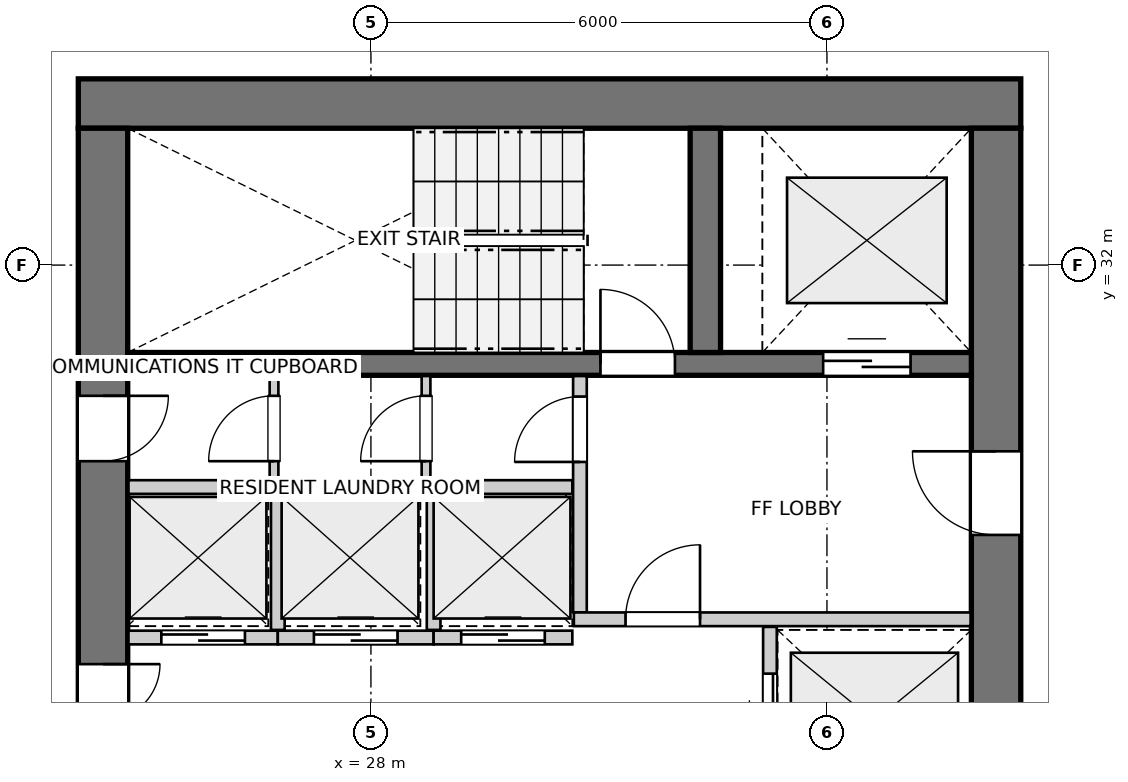
"""IFC4 building model, lengths in metres.
Left out: names, types, materials, properties, quantities, classifications, styles, units other than length and angle.
Written with IfcOpenShell. Run it as: python <this file> out.ifc"""

import sys

from ifc_helpers import new_model, si_unit, direction, frame, frame_2d, origin, place, context, subcontext, project, spatial, rectangle, extrude, source, transform, mapped, element, fill, save


model = new_model("IFC4")
c1 = context("Model", 3, precision=1e-05, world=origin(), true_north=direction((0.0, 1.0)))
c2 = subcontext(c1, "Body", "Model", "MODEL_VIEW")
j1 = project(units=[si_unit("LENGTHUNIT", "METRE"), si_unit("PLANEANGLEUNIT", "RADIAN")], contexts=[c1])
p1 = place(None, origin())
s1 = spatial("IfcSite", under=j1, at=p1, CompositionType="ELEMENT")
p2 = place(p1, origin())
s2 = spatial("IfcBuilding", under=s1, at=p2, CompositionType="ELEMENT")
p3 = place(p2, frame((0.0, 0.0, 155.4)))
s3 = spatial("IfcBuildingStorey", under=s2, at=p3, CompositionType="ELEMENT", Elevation=155.4)
p4 = place(p3, frame((36.55, 34.125, 0.0), z_axis=(0.0, 0.0, 1.0), x_axis=(-1.0, 0.0, 0.0)))
e1 = element("IfcWall", 1, at=p4, inside=s3, PredefinedType="SHEAR", context=c2, shape_type="SweptSolid", body=[
    extrude(rectangle(XDim=12.4, YDim=0.65, at=frame_2d((6.2, 0.0))), origin(), (0.0, 0.0, 1.0), 2.935),
])
p5 = place(p3, frame((24.475, 33.8, 0.0), z_axis=(0.0, 0.0, 1.0), x_axis=(0.0, -1.0, 0.0)))
e2 = element("IfcWall", 2, at=p5, inside=s3, PredefinedType="SHEAR", context=c2, shape_type="SweptSolid", body=[
    extrude(rectangle(XDim=15.6, YDim=0.65, at=frame_2d((7.8, 0.0))), origin(), (0.0, 0.0, 1.0), 2.935),
])
p6 = place(p5, frame((7.05, 0.0, 0.0)))
e3 = element("IfcOpeningElement", 3, at=p6, cuts=e2, PredefinedType="OPENING", context=c2, shape_type="SweptSolid", body=[
    extrude(rectangle(XDim=1.5, YDim=2.15, at=frame_2d((0.75, 1.075))), frame((0.0, 0.335, 0.0), z_axis=(0.0, -1.0, 0.0), x_axis=(1.0, 0.0, 0.0)), (0.0, 0.0, 1.0), 0.67),
])
p7 = place(p5, frame((3.52, 0.0, 0.0)))
e4 = element("IfcOpeningElement", 4, at=p7, cuts=e2, PredefinedType="OPENING", context=c2, shape_type="SweptSolid", body=[
    extrude(rectangle(XDim=0.86, YDim=2.05, at=frame_2d((0.43, 1.025))), frame((0.0, 0.335, 0.0), z_axis=(0.0, -1.0, 0.0), x_axis=(1.0, 0.0, 0.0)), (0.0, 0.0, 1.0), 0.67),
])
p8 = place(p5, frame((11.22, 0.0, 0.0)))
e5 = element("IfcOpeningElement", 5, at=p8, cuts=e2, PredefinedType="OPENING", context=c2, shape_type="SweptSolid", body=[
    extrude(rectangle(XDim=0.86, YDim=2.05, at=frame_2d((0.43, 1.025))), frame((0.0, 0.335, 0.0), z_axis=(0.0, -1.0, 0.0), x_axis=(1.0, 0.0, 0.0)), (0.0, 0.0, 1.0), 0.67),
])
p9 = place(p3, frame((36.225, 18.2, 0.0), z_axis=(0.0, 0.0, 1.0), x_axis=(0.0, 1.0, 0.0)))
e6 = element("IfcWall", 6, at=p9, inside=s3, PredefinedType="SHEAR", context=c2, shape_type="SweptSolid", body=[
    extrude(rectangle(XDim=15.6, YDim=0.65, at=frame_2d((7.8, 0.0))), origin(), (0.0, 0.0, 1.0), 2.935),
])
p10 = place(p9, frame((4.25, 0.0, 0.0)))
e7 = element("IfcOpeningElement", 7, at=p10, cuts=e6, PredefinedType="OPENING", context=c2, shape_type="SweptSolid", body=[
    extrude(rectangle(XDim=1.1, YDim=2.15, at=frame_2d((0.55, 1.075))), frame((0.0, 0.335, 0.0), z_axis=(0.0, -1.0, 0.0), x_axis=(1.0, 0.0, 0.0)), (0.0, 0.0, 1.0), 0.67),
])
p11 = place(p9, frame((10.25, 0.0, 0.0)))
e8 = element("IfcOpeningElement", 8, at=p11, cuts=e6, PredefinedType="OPENING", context=c2, shape_type="SweptSolid", body=[
    extrude(rectangle(XDim=1.1, YDim=2.15, at=frame_2d((0.55, 1.075))), frame((0.0, 0.335, 0.0), z_axis=(0.0, -1.0, 0.0), x_axis=(1.0, 0.0, 0.0)), (0.0, 0.0, 1.0), 0.67),
])
p12 = place(p3, frame((24.8, 30.7, 0.0), z_axis=(0.0, 0.0, 1.0), x_axis=(1.0, 0.0, 0.0)))
e9 = element("IfcWall", 9, at=p12, inside=s3, PredefinedType="SHEAR", context=c2, shape_type="SweptSolid", body=[
    extrude(rectangle(XDim=11.1, YDim=0.3, at=frame_2d((5.55, 0.0))), origin(), (0.0, 0.0, 1.0), 2.935),
])
p13 = place(p12, frame((6.22, 0.0, 0.0)))
e10 = element("IfcOpeningElement", 10, at=p13, cuts=e9, PredefinedType="OPENING", context=c2, shape_type="SweptSolid", body=[
    extrude(rectangle(XDim=0.98, YDim=2.15, at=frame_2d((0.49, 1.075))), frame((0.0, 0.16, 0.0), z_axis=(0.0, -1.0, 0.0), x_axis=(1.0, 0.0, 0.0)), (0.0, 0.0, 1.0), 0.32),
])
p14 = place(p12, frame((9.15, 0.0, 0.0)))
e11 = element("IfcOpeningElement", 11, at=p14, cuts=e9, PredefinedType="OPENING", context=c2, shape_type="SweptSolid", body=[
    extrude(rectangle(XDim=1.15, YDim=2.15, at=frame_2d((0.575, 1.075))), frame((0.0, 0.16, 0.0), z_axis=(0.0, -1.0, 0.0), x_axis=(1.0, 0.0, 0.0)), (0.0, 0.0, 1.0), 0.32),
])
p15 = place(p3, frame((32.4, 30.85, 0.0), z_axis=(0.0, 0.0, 1.0), x_axis=(0.0, 1.0, 0.0)))
e12 = element("IfcWall", 12, at=p15, inside=s3, PredefinedType="SHEAR", context=c2, shape_type="SweptSolid", body=[
    extrude(rectangle(XDim=2.95, YDim=0.4, at=frame_2d((1.475, 0.0))), origin(), (0.0, 0.0, 1.0), 2.935),
])
p16 = place(p3, frame((30.75, 27.43, 0.0), z_axis=(0.0, 0.0, 1.0), x_axis=(0.0, 1.0, 0.0)))
e13 = element("IfcWall", 13, at=p16, inside=s3, PredefinedType="PARTITIONING", context=c2, shape_type="SweptSolid", body=[
    extrude(rectangle(XDim=3.11, YDim=0.18, at=frame_2d((1.555, 0.0))), origin(), (0.0, 0.0, 1.0), 2.935),
])
p17 = place(p16, frame((1.98, 0.0, 0.0)))
e14 = element("IfcOpeningElement", 14, at=p17, cuts=e13, PredefinedType="OPENING", context=c2, shape_type="SweptSolid", body=[
    extrude(rectangle(XDim=0.86, YDim=2.05, at=frame_2d((0.43, 1.025))), frame((0.0, 0.1, 0.0), z_axis=(0.0, -1.0, 0.0), x_axis=(1.0, 0.0, 0.0)), (0.0, 0.0, 1.0), 0.2),
])
p18 = place(p3, frame((30.67, 27.34, 0.0), z_axis=(0.0, 0.0, 1.0), x_axis=(1.0, 0.0, 0.0)))
e15 = element("IfcWall", 15, at=p18, inside=s3, PredefinedType="PARTITIONING", context=c2, shape_type="SweptSolid", body=[
    extrude(rectangle(XDim=5.22, YDim=0.18, at=frame_2d((2.61, 0.0))), origin(), (0.0, 0.0, 1.0), 2.935),
])
p19 = place(p18, frame((0.68, 0.0, 0.0)))
e16 = element("IfcOpeningElement", 16, at=p19, cuts=e15, PredefinedType="OPENING", context=c2, shape_type="SweptSolid", body=[
    extrude(rectangle(XDim=0.98, YDim=2.15, at=frame_2d((0.49, 1.075))), frame((0.0, 0.1, 0.0), z_axis=(0.0, -1.0, 0.0), x_axis=(1.0, 0.0, 0.0)), (0.0, 0.0, 1.0), 0.2),
])
p20 = place(p3, frame((33.25, 24.76, 0.0), z_axis=(0.0, 0.0, 1.0), x_axis=(0.0, 1.0, 0.0)))
e17 = element("IfcWall", 17, at=p20, inside=s3, PredefinedType="PARTITIONING", context=c2, shape_type="SweptSolid", body=[
    extrude(rectangle(XDim=2.48, YDim=0.18, at=frame_2d((1.24, 0.0))), origin(), (0.0, 0.0, 1.0), 2.935),
])
p21 = place(p20, frame((0.615, 0.0, 0.0)))
e18 = element("IfcOpeningElement", 18, at=p21, cuts=e17, PredefinedType="OPENING", context=c2, shape_type="SweptSolid", body=[
    extrude(rectangle(XDim=1.25, YDim=2.15, at=frame_2d((0.625, 1.075))), frame((0.0, 0.1, 0.0), z_axis=(0.0, -1.0, 0.0), x_axis=(1.0, 0.0, 0.0)), (0.0, 0.0, 1.0), 0.2),
])
p22 = place(p3, frame((24.81, 29.08, 0.0), z_axis=(0.0, 0.0, 1.0), x_axis=(1.0, 0.0, 0.0)))
e19 = element("IfcWall", 19, at=p22, inside=s3, PredefinedType="PARTITIONING", context=c2, shape_type="SweptSolid", body=[
    extrude(rectangle(XDim=5.84, YDim=0.18, at=frame_2d((2.92, 0.0))), origin(), (0.0, 0.0, 1.0), 2.935),
])
p23 = place(p3, frame((24.81, 27.1, 0.0), z_axis=(0.0, 0.0, 1.0), x_axis=(1.0, 0.0, 0.0)))
e20 = element("IfcWall", 20, at=p23, inside=s3, PredefinedType="PARTITIONING", context=c2, shape_type="SweptSolid", body=[
    extrude(rectangle(XDim=1.965, YDim=0.18, at=frame_2d((0.982, 0.0))), origin(), (0.0, 0.0, 1.0), 2.935),
])
p24 = place(p23, frame((0.433, 0.0, 0.0)))
e21 = element("IfcOpeningElement", 21, at=p24, cuts=e20, PredefinedType="OPENING", context=c2, shape_type="SweptSolid", body=[
    extrude(rectangle(XDim=1.1, YDim=2.15, at=frame_2d((0.55, 1.075))), frame((0.0, 0.1, 0.0), z_axis=(0.0, -1.0, 0.0), x_axis=(1.0, 0.0, 0.0)), (0.0, 0.0, 1.0), 0.2),
])
p25 = place(p3, frame((26.775, 27.1, 0.0), z_axis=(0.0, 0.0, 1.0), x_axis=(1.0, 0.0, 0.0)))
e22 = element("IfcWall", 22, at=p25, inside=s3, PredefinedType="PARTITIONING", context=c2, shape_type="SweptSolid", body=[
    extrude(rectangle(XDim=2.05, YDim=0.18, at=frame_2d((1.025, 0.0))), origin(), (0.0, 0.0, 1.0), 2.935),
])
p26 = place(p25, frame((0.475, 0.0, 0.0)))
e23 = element("IfcOpeningElement", 23, at=p26, cuts=e22, PredefinedType="OPENING", context=c2, shape_type="SweptSolid", body=[
    extrude(rectangle(XDim=1.1, YDim=2.15, at=frame_2d((0.55, 1.075))), frame((0.0, 0.1, 0.0), z_axis=(0.0, -1.0, 0.0), x_axis=(1.0, 0.0, 0.0)), (0.0, 0.0, 1.0), 0.2),
])
p27 = place(p3, frame((26.775, 27.2, 0.0), z_axis=(0.0, 0.0, 1.0), x_axis=(0.0, 1.0, 0.0)))
e24 = element("IfcWall", 24, at=p27, inside=s3, PredefinedType="PARTITIONING", context=c2, shape_type="SweptSolid", body=[
    extrude(rectangle(XDim=1.78, YDim=0.18, at=frame_2d((0.89, 0.0))), origin(), (0.0, 0.0, 1.0), 2.935),
])
p28 = place(p3, frame((28.825, 27.1, 0.0), z_axis=(0.0, 0.0, 1.0), x_axis=(1.0, 0.0, 0.0)))
e25 = element("IfcWall", 25, at=p28, inside=s3, PredefinedType="PARTITIONING", context=c2, shape_type="SweptSolid", body=[
    extrude(rectangle(XDim=1.825, YDim=0.18, at=frame_2d((0.913, 0.0))), origin(), (0.0, 0.0, 1.0), 2.935),
])
p29 = place(p28, frame((0.363, 0.0, 0.0)))
e26 = element("IfcOpeningElement", 26, at=p29, cuts=e25, PredefinedType="OPENING", context=c2, shape_type="SweptSolid", body=[
    extrude(rectangle(XDim=1.1, YDim=2.15, at=frame_2d((0.55, 1.075))), frame((0.0, 0.1, 0.0), z_axis=(0.0, -1.0, 0.0), x_axis=(1.0, 0.0, 0.0)), (0.0, 0.0, 1.0), 0.2),
])
p30 = place(p3, frame((28.825, 27.2, 0.0), z_axis=(0.0, 0.0, 1.0), x_axis=(0.0, 1.0, 0.0)))
e27 = element("IfcWall", 27, at=p30, inside=s3, PredefinedType="PARTITIONING", context=c2, shape_type="SweptSolid", body=[
    extrude(rectangle(XDim=1.78, YDim=0.18, at=frame_2d((0.89, 0.0))), origin(), (0.0, 0.0, 1.0), 2.935),
])
p31 = place(p3, frame((26.725, 29.16, 0.0), z_axis=(0.0, 0.0, 1.0), x_axis=(0.0, 1.0, 0.0)))
e28 = element("IfcWall", 28, at=p31, inside=s3, PredefinedType="PARTITIONING", context=c2, shape_type="SweptSolid", body=[
    extrude(rectangle(XDim=1.38, YDim=0.115, at=frame_2d((0.69, 0.0))), origin(), (0.0, 0.0, 1.0), 2.935),
])
p32 = place(p31, frame((0.26, 0.0, 0.0)))
e29 = element("IfcOpeningElement", 29, at=p32, cuts=e28, PredefinedType="OPENING", context=c2, shape_type="SweptSolid", body=[
    extrude(rectangle(XDim=0.86, YDim=2.05, at=frame_2d((0.43, 1.025))), frame((0.0, 0.067, 0.0), z_axis=(0.0, -1.0, 0.0), x_axis=(1.0, 0.0, 0.0)), (0.0, 0.0, 1.0), 0.135),
])
p33 = place(p3, frame((28.725, 29.16, 0.0), z_axis=(0.0, 0.0, 1.0), x_axis=(0.0, 1.0, 0.0)))
e30 = element("IfcWall", 30, at=p33, inside=s3, PredefinedType="PARTITIONING", context=c2, shape_type="SweptSolid", body=[
    extrude(rectangle(XDim=1.38, YDim=0.115, at=frame_2d((0.69, 0.0))), origin(), (0.0, 0.0, 1.0), 2.935),
])
p34 = place(p33, frame((0.26, 0.0, 0.0)))
e31 = element("IfcOpeningElement", 31, at=p34, cuts=e30, PredefinedType="OPENING", context=c2, shape_type="SweptSolid", body=[
    extrude(rectangle(XDim=0.86, YDim=2.05, at=frame_2d((0.43, 1.025))), frame((0.0, 0.067, 0.0), z_axis=(0.0, -1.0, 0.0), x_axis=(1.0, 0.0, 0.0)), (0.0, 0.0, 1.0), 0.135),
])
m1 = source(origin(), c2, "Body", "SweptSolid", [
    extrude(rectangle(XDim=0.98, YDim=2.15, at=frame_2d((0.49, 1.075))), frame((0.0, 0.025, 0.0), z_axis=(0.0, -1.0, 0.0), x_axis=(1.0, 0.0, 0.0)), (0.0, 0.0, 1.0), 0.05),
])
p35 = place(p13, origin())
e32 = element("IfcDoor", 32, at=p35, inside=s3, OperationType="SINGLE_SWING_LEFT", PredefinedType="DOOR", context=c2, shape_type="MappedRepresentation", body=[
    mapped(m1, transform((0.0, 0.0, 0.0), x_axis=(1.0, 0.0, 0.0), y_axis=(0.0, 1.0, 0.0), z_axis=(0.0, 0.0, 1.0), scale=1.0)),
])
fill(e10, e32)
m2 = source(origin(), c2, "Body", "SweptSolid", [
    extrude(rectangle(XDim=1.15, YDim=2.15, at=frame_2d((0.575, 1.075))), frame((0.0, 0.025, 0.0), z_axis=(0.0, -1.0, 0.0), x_axis=(1.0, 0.0, 0.0)), (0.0, 0.0, 1.0), 0.05),
])
p36 = place(p14, origin())
e33 = element("IfcDoor", 33, at=p36, inside=s3, OperationType="DOUBLE_DOOR_SLIDING", PredefinedType="DOOR", context=c2, shape_type="MappedRepresentation", body=[
    mapped(m2, transform((0.0, 0.0, 0.0), x_axis=(1.0, 0.0, 0.0), y_axis=(0.0, 1.0, 0.0), z_axis=(0.0, 0.0, 1.0), scale=1.0)),
])
fill(e11, e33)
m3 = source(origin(), c2, "Body", "SweptSolid", [
    extrude(rectangle(XDim=1.1, YDim=2.15, at=frame_2d((0.55, 1.075))), frame((0.0, 0.025, 0.0), z_axis=(0.0, -1.0, 0.0), x_axis=(1.0, 0.0, 0.0)), (0.0, 0.0, 1.0), 0.05),
])
p37 = place(p11, origin())
e34 = element("IfcDoor", 34, at=p37, inside=s3, OperationType="SINGLE_SWING_RIGHT", PredefinedType="DOOR", context=c2, shape_type="MappedRepresentation", body=[
    mapped(m3, transform((0.0, 0.0, 0.0), x_axis=(1.0, 0.0, 0.0), y_axis=(0.0, 1.0, 0.0), z_axis=(0.0, 0.0, 1.0), scale=1.0)),
])
fill(e8, e34)
m4 = source(origin(), c2, "Body", "SweptSolid", [
    extrude(rectangle(XDim=1.5, YDim=2.15, at=frame_2d((0.75, 1.075))), frame((0.0, 0.025, 0.0), z_axis=(0.0, -1.0, 0.0), x_axis=(1.0, 0.0, 0.0)), (0.0, 0.0, 1.0), 0.05),
])
p38 = place(p6, origin())
e35 = element("IfcDoor", 35, at=p38, inside=s3, OperationType="DOUBLE_DOOR_SINGLE_SWING", PredefinedType="DOOR", context=c2, shape_type="MappedRepresentation", body=[
    mapped(m4, transform((0.0, 0.0, 0.0), x_axis=(1.0, 0.0, 0.0), y_axis=(0.0, 1.0, 0.0), z_axis=(0.0, 0.0, 1.0), scale=1.0)),
])
fill(e3, e35)
m5 = source(origin(), c2, "Body", "SweptSolid", [
    extrude(rectangle(XDim=0.86, YDim=2.05, at=frame_2d((0.43, 1.025))), frame((0.0, 0.025, 0.0), z_axis=(0.0, -1.0, 0.0), x_axis=(1.0, 0.0, 0.0)), (0.0, 0.0, 1.0), 0.05),
])
p39 = place(p7, origin())
e36 = element("IfcDoor", 36, at=p39, inside=s3, OperationType="SINGLE_SWING_LEFT", PredefinedType="DOOR", context=c2, shape_type="MappedRepresentation", body=[
    mapped(m5, transform((0.0, 0.0, 0.0), x_axis=(1.0, 0.0, 0.0), y_axis=(0.0, 1.0, 0.0), z_axis=(0.0, 0.0, 1.0), scale=1.0)),
])
fill(e4, e36)
p40 = place(p17, origin())
e37 = element("IfcDoor", 37, at=p40, inside=s3, OperationType="SINGLE_SWING_LEFT", PredefinedType="DOOR", context=c2, shape_type="MappedRepresentation", body=[
    mapped(m5, transform((0.0, 0.0, 0.0), x_axis=(1.0, 0.0, 0.0), y_axis=(0.0, 1.0, 0.0), z_axis=(0.0, 0.0, 1.0), scale=1.0)),
])
fill(e14, e37)
p41 = place(p19, origin())
e38 = element("IfcDoor", 38, at=p41, inside=s3, OperationType="SINGLE_SWING_RIGHT", PredefinedType="DOOR", context=c2, shape_type="MappedRepresentation", body=[
    mapped(m1, transform((0.0, 0.0, 0.0), x_axis=(1.0, 0.0, 0.0), y_axis=(0.0, 1.0, 0.0), z_axis=(0.0, 0.0, 1.0), scale=1.0)),
])
fill(e16, e38)
m6 = source(origin(), c2, "Body", "SweptSolid", [
    extrude(rectangle(XDim=1.25, YDim=2.15, at=frame_2d((0.625, 1.075))), frame((0.0, 0.025, 0.0), z_axis=(0.0, -1.0, 0.0), x_axis=(1.0, 0.0, 0.0)), (0.0, 0.0, 1.0), 0.05),
])
p42 = place(p21, origin())
e39 = element("IfcDoor", 39, at=p42, inside=s3, OperationType="DOUBLE_DOOR_SLIDING", PredefinedType="DOOR", context=c2, shape_type="MappedRepresentation", body=[
    mapped(m6, transform((0.0, 0.0, 0.0), x_axis=(1.0, 0.0, 0.0), y_axis=(0.0, 1.0, 0.0), z_axis=(0.0, 0.0, 1.0), scale=1.0)),
])
fill(e18, e39)
p43 = place(p24, origin())
e40 = element("IfcDoor", 40, at=p43, inside=s3, OperationType="DOUBLE_DOOR_SLIDING", PredefinedType="DOOR", context=c2, shape_type="MappedRepresentation", body=[
    mapped(m3, transform((0.0, 0.0, 0.0), x_axis=(1.0, 0.0, 0.0), y_axis=(0.0, 1.0, 0.0), z_axis=(0.0, 0.0, 1.0), scale=1.0)),
])
fill(e21, e40)
p44 = place(p26, origin())
e41 = element("IfcDoor", 41, at=p44, inside=s3, OperationType="DOUBLE_DOOR_SLIDING", PredefinedType="DOOR", context=c2, shape_type="MappedRepresentation", body=[
    mapped(m3, transform((0.0, 0.0, 0.0), x_axis=(1.0, 0.0, 0.0), y_axis=(0.0, 1.0, 0.0), z_axis=(0.0, 0.0, 1.0), scale=1.0)),
])
fill(e23, e41)
p45 = place(p29, origin())
e42 = element("IfcDoor", 42, at=p45, inside=s3, OperationType="DOUBLE_DOOR_SLIDING", PredefinedType="DOOR", context=c2, shape_type="MappedRepresentation", body=[
    mapped(m3, transform((0.0, 0.0, 0.0), x_axis=(1.0, 0.0, 0.0), y_axis=(0.0, 1.0, 0.0), z_axis=(0.0, 0.0, 1.0), scale=1.0)),
])
fill(e26, e42)
p46 = place(p32, origin())
e43 = element("IfcDoor", 43, at=p46, inside=s3, OperationType="SINGLE_SWING_LEFT", PredefinedType="DOOR", context=c2, shape_type="MappedRepresentation", body=[
    mapped(m5, transform((0.0, 0.0, 0.0), x_axis=(1.0, 0.0, 0.0), y_axis=(0.0, 1.0, 0.0), z_axis=(0.0, 0.0, 1.0), scale=1.0)),
])
fill(e29, e43)
p47 = place(p34, origin())
e44 = element("IfcDoor", 44, at=p47, inside=s3, OperationType="SINGLE_SWING_LEFT", PredefinedType="DOOR", context=c2, shape_type="MappedRepresentation", body=[
    mapped(m5, transform((0.0, 0.0, 0.0), x_axis=(1.0, 0.0, 0.0), y_axis=(0.0, 1.0, 0.0), z_axis=(0.0, 0.0, 1.0), scale=1.0)),
])
fill(e31, e44)
save(model, sys.argv[1])
